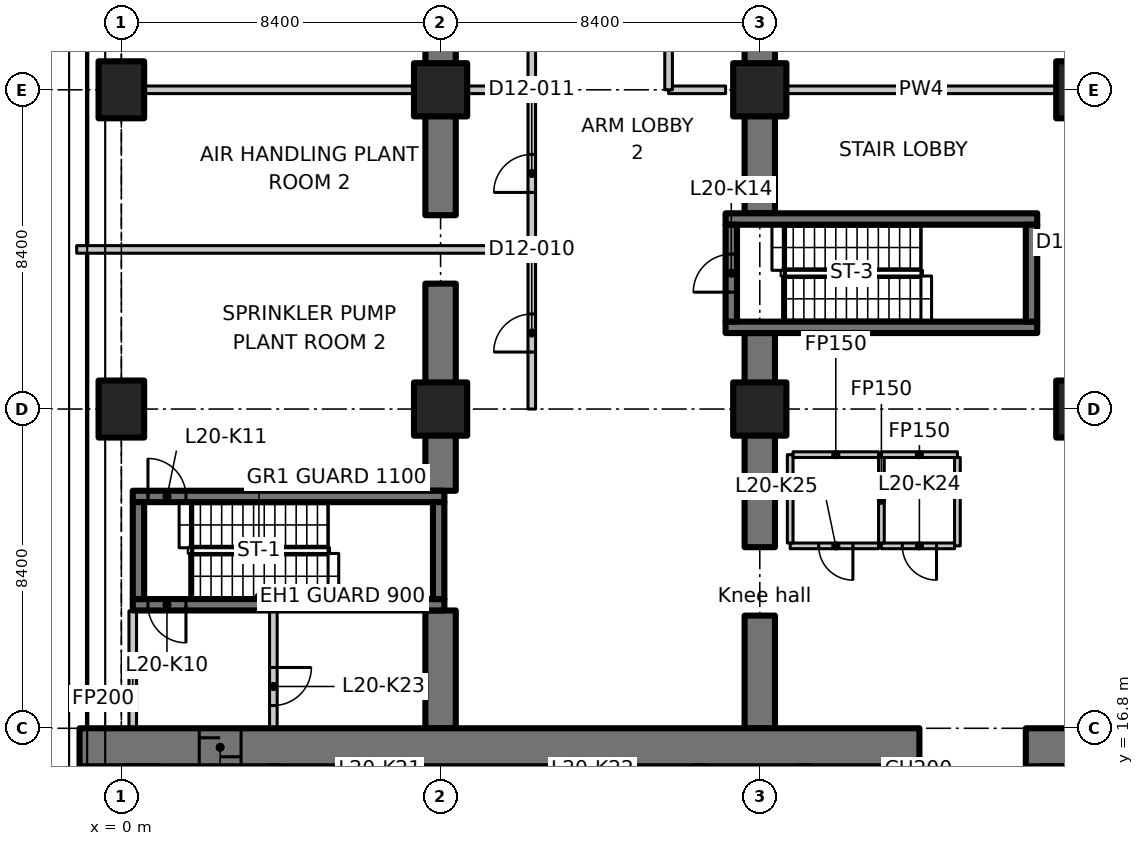
"""IFC4 building model, lengths in metres.
Left out: names, types, materials, properties, quantities, classifications, styles, units other than length and angle.
Written with IfcOpenShell. Run it as: python <this file> out.ifc"""

import sys

from ifc_helpers import new_model, si_unit, direction, frame, frame_2d, origin, origin_2d, place, context, subcontext, project, spatial, polyline, rectangle, outline, extrude, element, fill, save


model = new_model("IFC4")
c1 = context("Model", 3, precision=1e-05, world=origin(), true_north=direction((0.0, 1.0)))
c2 = subcontext(c1, "Body", "Model", "MODEL_VIEW")
j1 = project(units=[si_unit("LENGTHUNIT", "METRE"), si_unit("PLANEANGLEUNIT", "RADIAN")], contexts=[c1])
p1 = place(None, origin())
s1 = spatial("IfcSite", under=j1, at=p1, CompositionType="ELEMENT")
p2 = place(p1, origin())
s2 = spatial("IfcBuilding", under=s1, at=p2, CompositionType="ELEMENT")
p3 = place(p2, frame((0.0, 0.0, 86.9)))
s3 = spatial("IfcBuildingStorey", under=s2, at=p3, CompositionType="ELEMENT", Elevation=86.9)
for number, where, z_axis, x_axis in (
    (1, (0.0, 25.2, 0.0), (0.0, 0.0, 1.0), (1.0, 0.0, 0.0)),
    (2, (0.0, 33.6, 0.0), (0.0, 0.0, 1.0), (1.0, 0.0, 0.0)),
):
    element("IfcColumn", number, at=place(p3, frame(where, z_axis=z_axis, x_axis=x_axis)), inside=s3, PredefinedType="COLUMN", context=c2, shape_type="SweptSolid", body=[
        extrude(rectangle(XDim=1.2, YDim=1.5, at=origin_2d()), origin(), (0.0, 0.0, 1.0), 4.55),
    ])
for number, where, z_axis, x_axis in (
    (3, (8.4, 25.2, 0.0), (0.0, 0.0, 1.0), (1.0, 0.0, 0.0)),
    (4, (8.4, 33.6, 0.0), (0.0, 0.0, 1.0), (1.0, 0.0, 0.0)),
    (5, (16.8, 25.2, 0.0), (0.0, 0.0, 1.0), (1.0, 0.0, 0.0)),
    (6, (16.8, 33.6, 0.0), (0.0, 0.0, 1.0), (1.0, 0.0, 0.0)),
):
    element("IfcColumn", number, at=place(p3, frame(where, z_axis=z_axis, x_axis=x_axis)), inside=s3, PredefinedType="COLUMN", context=c2, shape_type="SweptSolid", body=[
        extrude(rectangle(XDim=1.4, YDim=1.4, at=origin_2d()), origin(), (0.0, 0.0, 1.0), 4.55),
    ])
for number, where, z_axis, x_axis in (
    (7, (25.2, 25.2, 0.0), (0.0, 0.0, 1.0), (1.0, 0.0, 0.0)),
    (8, (25.2, 33.6, 0.0), (0.0, 0.0, 1.0), (1.0, 0.0, 0.0)),
):
    element("IfcColumn", number, at=place(p3, frame(where, z_axis=z_axis, x_axis=x_axis)), inside=s3, PredefinedType="COLUMN", context=c2, shape_type="SweptSolid", body=[
        extrude(rectangle(XDim=1.2, YDim=1.5, at=origin_2d()), origin(), (0.0, 0.0, 1.0), 4.55),
    ])
p4 = place(p3, frame((8.4, 16.8, 0.0), z_axis=(0.0, 0.0, 1.0), x_axis=(0.0, 1.0, 0.0)))
e9 = element("IfcWall", 9, at=p4, inside=s3, PredefinedType="SHEAR", context=c2, shape_type="SweptSolid", body=[
    extrude(rectangle(XDim=3.1, YDim=0.8, at=frame_2d((1.55, 0.0))), origin(), (0.0, 0.0, 1.0), 4.55),
])
p5 = place(p3, frame((8.4, 23.05, 0.0), z_axis=(0.0, 0.0, 1.0), x_axis=(0.0, 1.0, 0.0)))
e10 = element("IfcWall", 10, at=p5, inside=s3, PredefinedType="SHEAR", context=c2, shape_type="SweptSolid", body=[
    extrude(rectangle(XDim=1.48, YDim=0.8, at=frame_2d((0.74, 0.0))), origin(), (0.0, 0.0, 1.0), 4.55),
])
for number, where, z_axis, x_axis in (
    (11, (8.4, 25.87, 0.0), (0.0, 0.0, 1.0), (0.0, 1.0, 0.0)),
    (12, (8.4, 30.3, 0.0), (0.0, 0.0, 1.0), (0.0, 1.0, 0.0)),
    (13, (8.4, 34.27, 0.0), (0.0, 0.0, 1.0), (0.0, 1.0, 0.0)),
):
    element("IfcWall", number, at=place(p3, frame(where, z_axis=z_axis, x_axis=x_axis)), inside=s3, PredefinedType="SHEAR", context=c2, shape_type="SweptSolid", body=[
        extrude(rectangle(XDim=2.63, YDim=0.8, at=frame_2d((1.315, 0.0))), origin(), (0.0, 0.0, 1.0), 4.55),
    ])
p6 = place(p3, frame((16.8, 16.8, 0.0), z_axis=(0.0, 0.0, 1.0), x_axis=(0.0, 1.0, 0.0)))
e14 = element("IfcWall", 14, at=p6, inside=s3, PredefinedType="SHEAR", context=c2, shape_type="SweptSolid", body=[
    extrude(rectangle(XDim=2.965, YDim=0.8, at=frame_2d((1.482, 0.0))), origin(), (0.0, 0.0, 1.0), 4.55),
])
p7 = place(p3, frame((16.8, 21.565, 0.0), z_axis=(0.0, 0.0, 1.0), x_axis=(0.0, 1.0, 0.0)))
e15 = element("IfcWall", 15, at=p7, inside=s3, PredefinedType="SHEAR", context=c2, shape_type="SweptSolid", body=[
    extrude(rectangle(XDim=2.965, YDim=0.8, at=frame_2d((1.482, 0.0))), origin(), (0.0, 0.0, 1.0), 4.55),
])
p8 = place(p3, frame((16.8, 30.35, 0.0), z_axis=(0.0, 0.0, 1.0), x_axis=(0.0, 1.0, 0.0)))
e16 = element("IfcWall", 16, at=p8, inside=s3, PredefinedType="SHEAR", context=c2, shape_type="SweptSolid", body=[
    extrude(rectangle(XDim=2.58, YDim=0.8, at=frame_2d((1.29, 0.0))), origin(), (0.0, 0.0, 1.0), 4.55),
])
p9 = place(p3, frame((16.8, 25.87, 0.0), z_axis=(0.0, 0.0, 1.0), x_axis=(0.0, 1.0, 0.0)))
e17 = element("IfcWall", 17, at=p9, inside=s3, PredefinedType="SHEAR", context=c2, shape_type="SweptSolid", body=[
    extrude(rectangle(XDim=1.33, YDim=0.8, at=frame_2d((0.665, 0.0))), origin(), (0.0, 0.0, 1.0), 4.55),
])
p10 = place(p3, frame((16.8, 34.27, 0.0), z_axis=(0.0, 0.0, 1.0), x_axis=(0.0, 1.0, 0.0)))
e18 = element("IfcWall", 18, at=p10, inside=s3, PredefinedType="SHEAR", context=c2, shape_type="SweptSolid", body=[
    extrude(rectangle(XDim=2.63, YDim=0.8, at=frame_2d((1.315, 0.0))), origin(), (0.0, 0.0, 1.0), 4.55),
])
p11 = place(p3, frame((-1.1, 16.3, 0.0), z_axis=(0.0, 0.0, 1.0), x_axis=(1.0, 0.0, 0.0)))
e19 = element("IfcWall", 19, at=p11, inside=s3, PredefinedType="SHEAR", context=c2, shape_type="SweptSolid", body=[
    extrude(rectangle(XDim=22.1, YDim=1.0, at=frame_2d((11.05, 0.0))), origin(), (0.0, 0.0, 1.0), 4.55),
])
p12 = place(p11, frame((3.15, 0.0, 0.0)))
e20 = element("IfcOpeningElement", 20, at=p12, cuts=e19, PredefinedType="OPENING", context=c2, shape_type="SweptSolid", body=[
    extrude(rectangle(XDim=1.1, YDim=2.3, at=frame_2d((0.55, 1.15))), frame((0.0, 0.51, 0.0), z_axis=(0.0, -1.0, 0.0), x_axis=(1.0, 0.0, 0.0)), (0.0, 0.0, 1.0), 1.02),
])
p13 = place(p3, frame((23.8, 16.3, 0.0), z_axis=(0.0, 0.0, 1.0), x_axis=(1.0, 0.0, 0.0)))
e21 = element("IfcWall", 21, at=p13, inside=s3, PredefinedType="SHEAR", context=c2, shape_type="SweptSolid", body=[
    extrude(rectangle(XDim=1.4, YDim=1.0, at=frame_2d((0.7, 0.0))), origin(), (0.0, 0.0, 1.0), 4.55),
])
p14 = place(p3, frame((24.7, 12.6, 0.0), z_axis=(0.0, 0.0, 1.0), x_axis=(0.0, 1.0, 0.0)))
e22 = element("IfcWall", 22, at=p14, inside=s3, PredefinedType="SHEAR", context=c2, shape_type="SweptSolid", body=[
    extrude(rectangle(XDim=3.2, YDim=1.0, at=frame_2d((1.6, 0.0))), origin(), (0.0, 0.0, 1.0), 4.55),
])
p15 = place(p3, frame((8.5, 20.05, 0.0), z_axis=(0.0, 0.0, 1.0), x_axis=(-1.0, 0.0, 0.0)))
e23 = element("IfcWall", 23, at=p15, inside=s3, PredefinedType="SHEAR", context=c2, shape_type="SweptSolid", body=[
    extrude(rectangle(XDim=8.2, YDim=0.3, at=frame_2d((4.1, 0.0))), origin(), (0.0, 0.0, 1.0), 4.55),
])
p16 = place(p15, frame((6.8, 0.0, 0.0)))
e24 = element("IfcOpeningElement", 24, at=p16, cuts=e23, PredefinedType="OPENING", context=c2, shape_type="SweptSolid", body=[
    extrude(rectangle(XDim=1.0, YDim=2.1, at=frame_2d((0.5, 1.05))), frame((0.0, 0.16, 0.0), z_axis=(0.0, -1.0, 0.0), x_axis=(1.0, 0.0, 0.0)), (0.0, 0.0, 1.0), 0.32),
])
p17 = place(p3, frame((0.3, 22.9, 0.0), z_axis=(0.0, 0.0, 1.0), x_axis=(1.0, 0.0, 0.0)))
e25 = element("IfcWall", 25, at=p17, inside=s3, PredefinedType="SHEAR", context=c2, shape_type="SweptSolid", body=[
    extrude(rectangle(XDim=8.2, YDim=0.3, at=frame_2d((4.1, 0.0))), origin(), (0.0, 0.0, 1.0), 4.55),
])
p18 = place(p17, frame((0.4, 0.0, 0.0)))
e26 = element("IfcOpeningElement", 26, at=p18, cuts=e25, PredefinedType="OPENING", context=c2, shape_type="SweptSolid", body=[
    extrude(rectangle(XDim=1.0, YDim=2.1, at=frame_2d((0.5, 1.05))), frame((0.0, 0.16, 0.0), z_axis=(0.0, -1.0, 0.0), x_axis=(1.0, 0.0, 0.0)), (0.0, 0.0, 1.0), 0.32),
])
for number, where, z_axis, x_axis in (
    (27, (0.45, 20.2, 0.0), (0.0, 0.0, 1.0), (0.0, 1.0, 0.0)),
    (28, (8.35, 20.2, 0.0), (0.0, 0.0, 1.0), (0.0, 1.0, 0.0)),
):
    element("IfcWall", number, at=place(p3, frame(where, z_axis=z_axis, x_axis=x_axis)), inside=s3, PredefinedType="SHEAR", context=c2, shape_type="SweptSolid", body=[
        extrude(rectangle(XDim=2.55, YDim=0.3, at=frame_2d((1.275, 0.0))), origin(), (0.0, 0.0, 1.0), 4.55),
    ])
for number, where, z_axis, x_axis in (
    (29, (15.9, 27.35, 0.0), (0.0, 0.0, 1.0), (1.0, 0.0, 0.0)),
    (30, (15.9, 30.2, 0.0), (0.0, 0.0, 1.0), (1.0, 0.0, 0.0)),
):
    element("IfcWall", number, at=place(p3, frame(where, z_axis=z_axis, x_axis=x_axis)), inside=s3, PredefinedType="SHEAR", context=c2, shape_type="SweptSolid", body=[
        extrude(rectangle(XDim=8.2, YDim=0.3, at=frame_2d((4.1, 0.0))), origin(), (0.0, 0.0, 1.0), 4.55),
    ])
p19 = place(p3, frame((16.05, 27.5, 0.0), z_axis=(0.0, 0.0, 1.0), x_axis=(0.0, 1.0, 0.0)))
e31 = element("IfcWall", 31, at=p19, inside=s3, PredefinedType="SHEAR", context=c2, shape_type="SweptSolid", body=[
    extrude(rectangle(XDim=2.55, YDim=0.3, at=frame_2d((1.275, 0.0))), origin(), (0.0, 0.0, 1.0), 4.55),
])
p20 = place(p19, frame((0.775, 0.0, 0.0)))
e32 = element("IfcOpeningElement", 32, at=p20, cuts=e31, PredefinedType="OPENING", context=c2, shape_type="SweptSolid", body=[
    extrude(rectangle(XDim=1.0, YDim=2.1, at=frame_2d((0.5, 1.05))), frame((0.0, 0.16, 0.0), z_axis=(0.0, -1.0, 0.0), x_axis=(1.0, 0.0, 0.0)), (0.0, 0.0, 1.0), 0.32),
])
p21 = place(p3, frame((23.95, 27.5, 0.0), z_axis=(0.0, 0.0, 1.0), x_axis=(0.0, 1.0, 0.0)))
e33 = element("IfcWall", 33, at=p21, inside=s3, PredefinedType="SHEAR", context=c2, shape_type="SweptSolid", body=[
    extrude(rectangle(XDim=2.55, YDim=0.3, at=frame_2d((1.275, 0.0))), origin(), (0.0, 0.0, 1.0), 4.55),
])
p22 = place(p3, frame((0.3, 16.812, 0.0), z_axis=(0.0, 0.0, 1.0), x_axis=(0.0, 1.0, 0.0)))
e34 = element("IfcWall", 34, at=p22, inside=s3, PredefinedType="PARTITIONING", context=c2, shape_type="SweptSolid", body=[
    extrude(rectangle(XDim=3.076, YDim=0.2, at=frame_2d((1.538, 0.0))), origin(), (0.0, 0.0, 1.0), 4.18),
])
p23 = place(p3, frame((4.0, 19.888, 0.0), z_axis=(0.0, 0.0, 1.0), x_axis=(0.0, -1.0, 0.0)))
e35 = element("IfcWall", 35, at=p23, inside=s3, PredefinedType="PARTITIONING", context=c2, shape_type="SweptSolid", body=[
    extrude(rectangle(XDim=3.076, YDim=0.2, at=frame_2d((1.538, 0.0))), origin(), (0.0, 0.0, 1.0), 4.55),
])
p24 = place(p23, frame((1.488, 0.0, 0.0)))
e36 = element("IfcOpeningElement", 36, at=p24, cuts=e35, PredefinedType="OPENING", context=c2, shape_type="SweptSolid", body=[
    extrude(rectangle(XDim=1.0, YDim=2.1, at=frame_2d((0.5, 1.05))), frame((0.0, 0.11, 0.0), z_axis=(0.0, -1.0, 0.0), x_axis=(1.0, 0.0, 0.0)), (0.0, 0.0, 1.0), 0.22),
])
p25 = place(p3, frame((20.0, 24.0, 0.0), z_axis=(0.0, 0.0, 1.0), x_axis=(1.0, 0.0, 0.0)))
e37 = element("IfcWall", 37, at=p25, inside=s3, PredefinedType="PARTITIONING", context=c2, shape_type="SweptSolid", body=[
    extrude(rectangle(XDim=2.0, YDim=0.15, at=frame_2d((1.0, 0.0))), origin(), (0.0, 0.0, 1.0), 4.55),
])
p26 = place(p3, frame((22.0, 23.925, 0.0), z_axis=(0.0, 0.0, 1.0), x_axis=(0.0, -1.0, 0.0)))
e38 = element("IfcWall", 38, at=p26, inside=s3, PredefinedType="PARTITIONING", context=c2, shape_type="SweptSolid", body=[
    extrude(rectangle(XDim=2.325, YDim=0.15, at=frame_2d((1.163, 0.0))), origin(), (0.0, 0.0, 1.0), 4.55),
])
p27 = place(p3, frame((21.925, 21.6, 0.0), z_axis=(0.0, 0.0, 1.0), x_axis=(-1.0, 0.0, 0.0)))
e39 = element("IfcWall", 39, at=p27, inside=s3, PredefinedType="PARTITIONING", context=c2, shape_type="SweptSolid", body=[
    extrude(rectangle(XDim=1.925, YDim=0.15, at=frame_2d((0.962, 0.0))), origin(), (0.0, 0.0, 1.0), 4.55),
])
p28 = place(p27, frame((0.475, 0.0, 0.0)))
e40 = element("IfcOpeningElement", 40, at=p28, cuts=e39, PredefinedType="OPENING", context=c2, shape_type="SweptSolid", body=[
    extrude(rectangle(XDim=0.9, YDim=2.1, at=frame_2d((0.45, 1.05))), frame((0.0, 0.085, 0.0), z_axis=(0.0, -1.0, 0.0), x_axis=(1.0, 0.0, 0.0)), (0.0, 0.0, 1.0), 0.17),
])
p29 = place(p3, frame((20.0, 21.675, 0.0), z_axis=(0.0, 0.0, 1.0), x_axis=(0.0, 1.0, 0.0)))
e41 = element("IfcWall", 41, at=p29, inside=s3, PredefinedType="PARTITIONING", context=c2, shape_type="SweptSolid", body=[
    extrude(rectangle(XDim=2.25, YDim=0.15, at=frame_2d((1.125, 0.0))), origin(), (0.0, 0.0, 1.0), 4.55),
])
p30 = place(p3, frame((19.925, 21.6, 0.0), z_axis=(0.0, 0.0, 1.0), x_axis=(-1.0, 0.0, 0.0)))
e42 = element("IfcWall", 42, at=p30, inside=s3, PredefinedType="PARTITIONING", context=c2, shape_type="SweptSolid", body=[
    extrude(rectangle(XDim=2.325, YDim=0.15, at=frame_2d((1.163, 0.0))), origin(), (0.0, 0.0, 1.0), 4.55),
])
p31 = place(p30, frame((0.675, 0.0, 0.0)))
e43 = element("IfcOpeningElement", 43, at=p31, cuts=e42, PredefinedType="OPENING", context=c2, shape_type="SweptSolid", body=[
    extrude(rectangle(XDim=0.9, YDim=2.1, at=frame_2d((0.45, 1.05))), frame((0.0, 0.085, 0.0), z_axis=(0.0, -1.0, 0.0), x_axis=(1.0, 0.0, 0.0)), (0.0, 0.0, 1.0), 0.17),
])
p32 = place(p3, frame((17.6, 21.675, 0.0), z_axis=(0.0, 0.0, 1.0), x_axis=(0.0, 1.0, 0.0)))
e44 = element("IfcWall", 44, at=p32, inside=s3, PredefinedType="PARTITIONING", context=c2, shape_type="SweptSolid", body=[
    extrude(rectangle(XDim=2.325, YDim=0.15, at=frame_2d((1.163, 0.0))), origin(), (0.0, 0.0, 1.0), 4.55),
])
p33 = place(p3, frame((17.675, 24.0, 0.0), z_axis=(0.0, 0.0, 1.0), x_axis=(1.0, 0.0, 0.0)))
e45 = element("IfcWall", 45, at=p33, inside=s3, PredefinedType="PARTITIONING", context=c2, shape_type="SweptSolid", body=[
    extrude(rectangle(XDim=2.25, YDim=0.15, at=frame_2d((1.125, 0.0))), origin(), (0.0, 0.0, 1.0), 4.55),
])
p34 = place(p3, frame((10.8, 25.2, 0.0), z_axis=(0.0, 0.0, 1.0), x_axis=(0.0, 1.0, 0.0)))
e46 = element("IfcWall", 46, at=p34, inside=s3, PredefinedType="PARTITIONING", context=c2, shape_type="SweptSolid", body=[
    extrude(rectangle(XDim=4.2, YDim=0.2, at=frame_2d((2.1, 0.0))), origin(), (0.0, 0.0, 1.0), 4.53),
])
p35 = place(p34, frame((1.5, 0.0, 0.0)))
e47 = element("IfcOpeningElement", 47, at=p35, cuts=e46, PredefinedType="OPENING", context=c2, shape_type="SweptSolid", body=[
    extrude(rectangle(XDim=1.0, YDim=2.1, at=frame_2d((0.5, 1.05))), frame((0.0, 0.11, 0.0), z_axis=(0.0, -1.0, 0.0), x_axis=(1.0, 0.0, 0.0)), (0.0, 0.0, 1.0), 0.22),
])
p36 = place(p3, frame((10.8, 29.4, 0.0), z_axis=(0.0, 0.0, 1.0), x_axis=(0.0, 1.0, 0.0)))
e48 = element("IfcWall", 48, at=p36, inside=s3, PredefinedType="PARTITIONING", context=c2, shape_type="SweptSolid", body=[
    extrude(rectangle(XDim=4.2, YDim=0.2, at=frame_2d((2.1, 0.0))), origin(), (0.0, 0.0, 1.0), 4.53),
])
p37 = place(p36, frame((1.5, 0.0, 0.0)))
e49 = element("IfcOpeningElement", 49, at=p37, cuts=e48, PredefinedType="OPENING", context=c2, shape_type="SweptSolid", body=[
    extrude(rectangle(XDim=1.0, YDim=2.1, at=frame_2d((0.5, 1.05))), frame((0.0, 0.11, 0.0), z_axis=(0.0, -1.0, 0.0), x_axis=(1.0, 0.0, 0.0)), (0.0, 0.0, 1.0), 0.22),
])
p38 = place(p3, frame((14.4, 33.6, 0.0), z_axis=(0.0, 0.0, 1.0), x_axis=(1.0, 0.0, 0.0)))
e50 = element("IfcWall", 50, at=p38, inside=s3, PredefinedType="PARTITIONING", context=c2, shape_type="SweptSolid", body=[
    extrude(rectangle(XDim=1.5, YDim=0.2, at=frame_2d((0.75, 0.0))), origin(), (0.0, 0.0, 1.0), 4.53),
])
p39 = place(p3, frame((17.52, 33.6, 0.0), z_axis=(0.0, 0.0, 1.0), x_axis=(1.0, 0.0, 0.0)))
e51 = element("IfcWall", 51, at=p39, inside=s3, PredefinedType="PARTITIONING", context=c2, shape_type="SweptSolid", body=[
    extrude(rectangle(XDim=7.06, YDim=0.2, at=frame_2d((3.53, 0.0))), origin(), (0.0, 0.0, 1.0), 4.53),
])
p40 = place(p3, frame((10.8, 33.6, 0.0), z_axis=(0.0, 0.0, 1.0), x_axis=(0.0, 1.0, 0.0)))
e52 = element("IfcWall", 52, at=p40, inside=s3, PredefinedType="PARTITIONING", context=c2, shape_type="SweptSolid", body=[
    extrude(rectangle(XDim=16.8, YDim=0.2, at=frame_2d((8.4, 0.0))), origin(), (0.0, 0.0, 1.0), 4.53),
])
p41 = place(p40, frame((7.5, 0.0, 0.0)))
e53 = element("IfcOpeningElement", 53, at=p41, cuts=e52, PredefinedType="OPENING", context=c2, shape_type="SweptSolid", body=[
    extrude(rectangle(XDim=1.8, YDim=2.1, at=frame_2d((0.9, 1.05))), frame((0.0, 0.11, 0.0), z_axis=(0.0, -1.0, 0.0), x_axis=(1.0, 0.0, 0.0)), (0.0, 0.0, 1.0), 0.22),
])
p42 = place(p3, frame((14.4, 50.4, 0.0), z_axis=(0.0, 0.0, 1.0), x_axis=(0.0, -1.0, 0.0)))
e54 = element("IfcWall", 54, at=p42, inside=s3, PredefinedType="PARTITIONING", context=c2, shape_type="SweptSolid", body=[
    extrude(rectangle(XDim=16.8, YDim=0.2, at=frame_2d((8.4, 0.0))), origin(), (0.0, 0.0, 1.0), 4.53),
])
p43 = place(p42, frame((7.5, 0.0, 0.0)))
e55 = element("IfcOpeningElement", 55, at=p43, cuts=e54, PredefinedType="OPENING", context=c2, shape_type="SweptSolid", body=[
    extrude(rectangle(XDim=1.8, YDim=2.1, at=frame_2d((0.9, 1.05))), frame((0.0, 0.11, 0.0), z_axis=(0.0, -1.0, 0.0), x_axis=(1.0, 0.0, 0.0)), (0.0, 0.0, 1.0), 0.22),
])
p44 = place(p3, frame((-1.176, 29.4, 0.0), z_axis=(0.0, 0.0, 1.0), x_axis=(1.0, 0.0, 0.0)))
e56 = element("IfcWall", 56, at=p44, inside=s3, PredefinedType="PARTITIONING", context=c2, shape_type="SweptSolid", body=[
    extrude(outline(polyline([(0.0, 0.0), (11.976, 0.0), (11.976, 4.53), (1.625, 4.53), (1.624, 4.18), (0.728, 4.18), (0.726, 4.53), (0.075, 4.53), (0.0, 4.53), (0.0, 0.0)])), frame((0.0, 0.1, 0.0), z_axis=(0.0, -1.0, 0.0), x_axis=(1.0, 0.0, 0.0)), (0.0, 0.0, 1.0), 0.2),
])
p45 = place(p3, frame((0.62, 33.6, 0.0), z_axis=(0.0, 0.0, 1.0), x_axis=(1.0, 0.0, 0.0)))
e57 = element("IfcWall", 57, at=p45, inside=s3, PredefinedType="PARTITIONING", context=c2, shape_type="SweptSolid", body=[
    extrude(rectangle(XDim=7.06, YDim=0.2, at=frame_2d((3.53, 0.0))), origin(), (0.0, 0.0, 1.0), 4.53),
])
p46 = place(p3, frame((9.12, 33.6, 0.0), z_axis=(0.0, 0.0, 1.0), x_axis=(1.0, 0.0, 0.0)))
e58 = element("IfcWall", 58, at=p46, inside=s3, PredefinedType="PARTITIONING", context=c2, shape_type="SweptSolid", body=[
    extrude(rectangle(XDim=1.68, YDim=0.2, at=frame_2d((0.84, 0.0))), origin(), (0.0, 0.0, 1.0), 4.53),
])
p47 = place(p12, origin())
e59 = element("IfcDoor", 59, at=p47, inside=s3, OperationType="SLIDING_TO_LEFT", PredefinedType="DOOR", context=c2, shape_type="SweptSolid", body=[
    extrude(rectangle(XDim=1.1, YDim=2.3, at=frame_2d((0.55, 1.15))), frame((0.0, 0.025, 0.0), z_axis=(0.0, -1.0, 0.0), x_axis=(1.0, 0.0, 0.0)), (0.0, 0.0, 1.0), 0.05),
])
fill(e20, e59)
p48 = place(p16, origin())
e60 = element("IfcDoor", 60, at=p48, inside=s3, OperationType="SINGLE_SWING_RIGHT", PredefinedType="DOOR", context=c2, shape_type="SweptSolid", body=[
    extrude(rectangle(XDim=1.0, YDim=2.1, at=frame_2d((0.5, 1.05))), frame((0.0, 0.025, 0.0), z_axis=(0.0, -1.0, 0.0), x_axis=(1.0, 0.0, 0.0)), (0.0, 0.0, 1.0), 0.05),
])
fill(e24, e60)
p49 = place(p18, origin())
e61 = element("IfcDoor", 61, at=p49, inside=s3, OperationType="SINGLE_SWING_LEFT", PredefinedType="DOOR", context=c2, shape_type="SweptSolid", body=[
    extrude(rectangle(XDim=1.0, YDim=2.1, at=frame_2d((0.5, 1.05))), frame((0.0, 0.025, 0.0), z_axis=(0.0, -1.0, 0.0), x_axis=(1.0, 0.0, 0.0)), (0.0, 0.0, 1.0), 0.05),
])
fill(e26, e61)
p50 = place(p20, origin())
e62 = element("IfcDoor", 62, at=p50, inside=s3, OperationType="SINGLE_SWING_RIGHT", PredefinedType="DOOR", context=c2, shape_type="SweptSolid", body=[
    extrude(rectangle(XDim=1.0, YDim=2.1, at=frame_2d((0.5, 1.05))), frame((0.0, 0.025, 0.0), z_axis=(0.0, -1.0, 0.0), x_axis=(1.0, 0.0, 0.0)), (0.0, 0.0, 1.0), 0.05),
])
fill(e32, e62)
p51 = place(p24, origin())
e63 = element("IfcDoor", 63, at=p51, inside=s3, OperationType="SINGLE_SWING_LEFT", PredefinedType="DOOR", context=c2, shape_type="SweptSolid", body=[
    extrude(rectangle(XDim=1.0, YDim=2.1, at=frame_2d((0.5, 1.05))), frame((0.0, 0.025, 0.0), z_axis=(0.0, -1.0, 0.0), x_axis=(1.0, 0.0, 0.0)), (0.0, 0.0, 1.0), 0.05),
])
fill(e36, e63)
p52 = place(p28, origin())
e64 = element("IfcDoor", 64, at=p52, inside=s3, OperationType="SINGLE_SWING_RIGHT", PredefinedType="DOOR", context=c2, shape_type="SweptSolid", body=[
    extrude(rectangle(XDim=0.9, YDim=2.1, at=frame_2d((0.45, 1.05))), frame((0.0, 0.025, 0.0), z_axis=(0.0, -1.0, 0.0), x_axis=(1.0, 0.0, 0.0)), (0.0, 0.0, 1.0), 0.05),
])
fill(e40, e64)
p53 = place(p31, origin())
e65 = element("IfcDoor", 65, at=p53, inside=s3, OperationType="SINGLE_SWING_LEFT", PredefinedType="DOOR", context=c2, shape_type="SweptSolid", body=[
    extrude(rectangle(XDim=0.9, YDim=2.1, at=frame_2d((0.45, 1.05))), frame((0.0, 0.025, 0.0), z_axis=(0.0, -1.0, 0.0), x_axis=(1.0, 0.0, 0.0)), (0.0, 0.0, 1.0), 0.05),
])
fill(e43, e65)
p54 = place(p35, origin())
e66 = element("IfcDoor", 66, at=p54, inside=s3, OperationType="SINGLE_SWING_LEFT", PredefinedType="DOOR", context=c2, shape_type="SweptSolid", body=[
    extrude(rectangle(XDim=1.0, YDim=2.1, at=frame_2d((0.5, 1.05))), frame((0.0, 0.025, 0.0), z_axis=(0.0, -1.0, 0.0), x_axis=(1.0, 0.0, 0.0)), (0.0, 0.0, 1.0), 0.05),
])
fill(e47, e66)
p55 = place(p37, origin())
e67 = element("IfcDoor", 67, at=p55, inside=s3, OperationType="SINGLE_SWING_LEFT", PredefinedType="DOOR", context=c2, shape_type="SweptSolid", body=[
    extrude(rectangle(XDim=1.0, YDim=2.1, at=frame_2d((0.5, 1.05))), frame((0.0, 0.025, 0.0), z_axis=(0.0, -1.0, 0.0), x_axis=(1.0, 0.0, 0.0)), (0.0, 0.0, 1.0), 0.05),
])
fill(e49, e67)
save(model, sys.argv[1])
